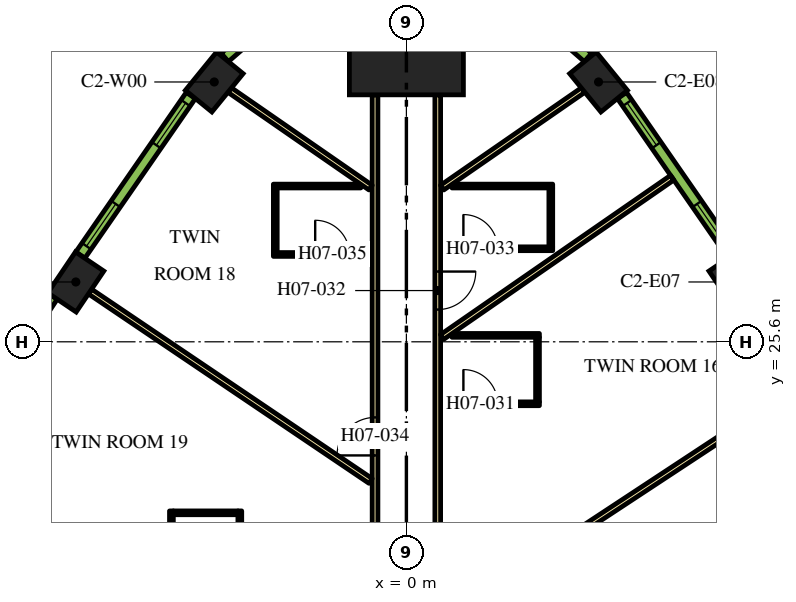
"""IFC4 building model, lengths in metres.
Left out: names, types, materials, properties, quantities, classifications, styles, units other than length and angle.
Written with IfcOpenShell. Run it as: python <this file> out.ifc"""

import sys

from ifc_helpers import new_model, si_unit, direction, frame, frame_2d, origin, origin_2d, place, context, subcontext, project, spatial, rectangle, extrude, element, fill, save


model = new_model("IFC4")
c1 = context("Model", 3, precision=1e-05, world=origin(), true_north=direction((0.0, 1.0)))
c2 = subcontext(c1, "Body", "Model", "MODEL_VIEW")
j1 = project(units=[si_unit("LENGTHUNIT", "METRE"), si_unit("PLANEANGLEUNIT", "RADIAN")], contexts=[c1])
p1 = place(None, origin())
s1 = spatial("IfcSite", under=j1, at=p1, CompositionType="ELEMENT")
p2 = place(p1, origin())
s2 = spatial("IfcBuilding", under=s1, at=p2, CompositionType="ELEMENT")
p3 = place(p2, frame((0.0, 0.0, 99.3)))
s3 = spatial("IfcBuildingStorey", under=s2, at=p3, CompositionType="ELEMENT", Elevation=99.3)
p4 = place(p3, frame((0.0, 33.598, 0.0), z_axis=(0.0, 0.0, 1.0), x_axis=(0.0, 1.0, 0.0)))
e1 = element("IfcColumn", 1, at=p4, inside=s3, PredefinedType="COLUMN", context=c2, shape_type="SweptSolid", body=[
    extrude(rectangle(XDim=3.0, YDim=3.0, at=origin_2d()), origin(), (0.0, 0.0, 1.0), 3.9),
])
for number, where, z_axis, x_axis in (
    (2, (8.699, 27.174, 0.0), (0.0, 0.0, 1.0), (-0.559, 0.829, 0.0)),
    (3, (5.056, 32.437, 0.0), (0.0, 0.0, 1.0), (-0.632, 0.775, 0.0)),
    (4, (-5.056, 32.437, 0.0), (0.0, 0.0, 1.0), (-0.632, -0.775, 0.0)),
    (5, (-8.699, 27.174, 0.0), (0.0, 0.0, 1.0), (-0.559, -0.829, 0.0)),
):
    element("IfcColumn", number, at=place(p3, frame(where, z_axis=z_axis, x_axis=x_axis)), inside=s3, PredefinedType="COLUMN", context=c2, shape_type="SweptSolid", body=[
        extrude(rectangle(XDim=1.3, YDim=0.9, at=origin_2d()), origin(), (0.0, 0.0, 1.0), 3.9),
    ])
p5 = place(p3, frame((0.825, 32.098, 0.0), z_axis=(0.0, 0.0, 1.0), x_axis=(0.0, -1.0, 0.0)))
e6 = element("IfcWall", 6, at=p5, inside=s3, PredefinedType="PARTITIONING", context=c2, shape_type="SweptSolid", body=[
    extrude(rectangle(XDim=13.543, YDim=0.15, at=frame_2d((6.772, 0.0))), origin(), (0.0, 0.0, 1.0), 2.75),
])
p6 = place(p5, frame((12.213, 0.0, 0.0)))
e7 = element("IfcOpeningElement", 7, at=p6, cuts=e6, PredefinedType="OPENING", context=c2, shape_type="SweptSolid", body=[
    extrude(rectangle(XDim=1.0, YDim=2.1, at=frame_2d((0.5, 1.05))), frame((0.0, 0.085, 0.0), z_axis=(0.0, -1.0, 0.0), x_axis=(1.0, 0.0, 0.0)), (0.0, 0.0, 1.0), 0.17),
])
p7 = place(p5, frame((4.65, 0.0, 0.0)))
e8 = element("IfcOpeningElement", 8, at=p7, cuts=e6, PredefinedType="OPENING", context=c2, shape_type="SweptSolid", body=[
    extrude(rectangle(XDim=1.0, YDim=2.1, at=frame_2d((0.5, 1.05))), frame((0.0, 0.085, 0.0), z_axis=(0.0, -1.0, 0.0), x_axis=(1.0, 0.0, 0.0)), (0.0, 0.0, 1.0), 0.17),
])
p8 = place(p3, frame((-0.825, 18.475, 0.0), z_axis=(0.0, 0.0, 1.0), x_axis=(0.0, 1.0, 0.0)))
e9 = element("IfcWall", 9, at=p8, inside=s3, PredefinedType="PARTITIONING", context=c2, shape_type="SweptSolid", body=[
    extrude(rectangle(XDim=13.623, YDim=0.15, at=frame_2d((6.812, 0.0))), origin(), (0.0, 0.0, 1.0), 2.75),
])
p9 = place(p8, frame((4.135, 0.0, 0.0)))
e10 = element("IfcOpeningElement", 10, at=p9, cuts=e9, PredefinedType="OPENING", context=c2, shape_type="SweptSolid", body=[
    extrude(rectangle(XDim=1.0, YDim=2.1, at=frame_2d((0.5, 1.05))), frame((0.0, 0.085, 0.0), z_axis=(0.0, -1.0, 0.0), x_axis=(1.0, 0.0, 0.0)), (0.0, 0.0, 1.0), 0.17),
])
p10 = place(p3, frame((-11.838, 21.585, 0.0), z_axis=(0.0, 0.0, 1.0), x_axis=(0.841699322813, -0.539946525108, 0.0)))
e11 = element("IfcWall", 11, at=p10, inside=s3, PredefinedType="PARTITIONING", context=c2, shape_type="SweptSolid", body=[
    extrude(rectangle(XDim=6.392, YDim=0.15, at=frame_2d((3.196, 0.0))), origin(), (0.0, 0.0, 1.0), 2.75),
])
p11 = place(p3, frame((-8.326, 26.923, 0.0), z_axis=(0.0, 0.0, 1.0), x_axis=(0.828836601893, -0.5594907393, 0.0)))
e12 = element("IfcWall", 12, at=p11, inside=s3, PredefinedType="PARTITIONING", context=c2, shape_type="SweptSolid", body=[
    extrude(rectangle(XDim=8.909, YDim=0.15, at=frame_2d((4.455, 0.0))), origin(), (0.0, 0.0, 1.0), 2.75),
])
p12 = place(p3, frame((-4.649, 32.223, 0.0), z_axis=(0.0, 0.0, 1.0), x_axis=(0.822262349475, -0.569108626394, 0.0)))
e13 = element("IfcWall", 13, at=p12, inside=s3, PredefinedType="PARTITIONING", context=c2, shape_type="SweptSolid", body=[
    extrude(rectangle(XDim=4.51, YDim=0.15, at=frame_2d((2.255, 0.0))), origin(), (0.0, 0.0, 1.0), 2.75),
])
p13 = place(p3, frame((6.994, 29.917, 0.0), z_axis=(0.0, 0.0, 1.0), x_axis=(-0.822255462494, -0.569118576747, 0.0)))
e14 = element("IfcWall", 14, at=p13, inside=s3, PredefinedType="PARTITIONING", context=c2, shape_type="SweptSolid", body=[
    extrude(rectangle(XDim=7.362, YDim=0.15, at=frame_2d((3.681, 0.0))), origin(), (0.0, 0.0, 1.0), 2.75),
])
p14 = place(p3, frame((10.592, 24.589, 0.0), z_axis=(0.0, 0.0, 1.0), x_axis=(-0.835337323748, -0.549737715236, 0.0)))
e15 = element("IfcWall", 15, at=p14, inside=s3, PredefinedType="PARTITIONING", context=c2, shape_type="SweptSolid", body=[
    extrude(rectangle(XDim=10.875, YDim=0.15, at=frame_2d((5.438, 0.0))), origin(), (0.0, 0.0, 1.0), 2.75),
])
p15 = place(p3, frame((4.649, 32.223, 0.0), z_axis=(0.0, 0.0, 1.0), x_axis=(-0.822262349475, -0.569108626394, 0.0)))
e16 = element("IfcWall", 16, at=p15, inside=s3, PredefinedType="PARTITIONING", context=c2, shape_type="SweptSolid", body=[
    extrude(rectangle(XDim=4.51, YDim=0.15, at=frame_2d((2.255, 0.0))), origin(), (0.0, 0.0, 1.0), 2.75),
])
p16 = place(p3, frame((0.9, 23.969, 0.0), z_axis=(0.0, 0.0, 1.0), x_axis=(1.0, 0.0, 0.0)))
e17 = element("IfcWall", 17, at=p16, inside=s3, PredefinedType="PARTITIONING", context=c2, shape_type="SweptSolid", body=[
    extrude(rectangle(XDim=2.6, YDim=0.1, at=frame_2d((1.3, 0.0))), origin(), (0.0, 0.0, 1.0), 2.75),
])
p17 = place(p16, frame((0.6, 0.0, 0.0)))
e18 = element("IfcOpeningElement", 18, at=p17, cuts=e17, PredefinedType="OPENING", context=c2, shape_type="SweptSolid", body=[
    extrude(rectangle(XDim=0.9, YDim=2.1, at=frame_2d((0.45, 1.05))), frame((0.0, 0.06, 0.0), z_axis=(0.0, -1.0, 0.0), x_axis=(1.0, 0.0, 0.0)), (0.0, 0.0, 1.0), 0.12),
])
p18 = place(p3, frame((3.45, 24.019, 0.0), z_axis=(0.0, 0.0, 1.0), x_axis=(0.0, 1.0, 0.0)))
e19 = element("IfcWall", 19, at=p18, inside=s3, PredefinedType="PARTITIONING", context=c2, shape_type="SweptSolid", body=[
    extrude(rectangle(XDim=1.7, YDim=0.1, at=frame_2d((0.85, 0.0))), origin(), (0.0, 0.0, 1.0), 2.75),
])
p19 = place(p3, frame((1.2, 25.769, 0.0), z_axis=(0.0, 0.0, 1.0), x_axis=(1.0, 0.0, 0.0)))
e20 = element("IfcWall", 20, at=p19, inside=s3, PredefinedType="PARTITIONING", context=c2, shape_type="SweptSolid", body=[
    extrude(rectangle(XDim=2.3, YDim=0.1, at=frame_2d((1.15, 0.0))), origin(), (0.0, 0.0, 1.0), 2.75),
])
p20 = place(p3, frame((0.9, 28.048, 0.0), z_axis=(0.0, 0.0, 1.0), x_axis=(1.0, 0.0, 0.0)))
e21 = element("IfcWall", 21, at=p20, inside=s3, PredefinedType="PARTITIONING", context=c2, shape_type="SweptSolid", body=[
    extrude(rectangle(XDim=2.95, YDim=0.1, at=frame_2d((1.475, 0.0))), origin(), (0.0, 0.0, 1.0), 2.75),
])
p21 = place(p20, frame((0.6, 0.0, 0.0)))
e22 = element("IfcOpeningElement", 22, at=p21, cuts=e21, PredefinedType="OPENING", context=c2, shape_type="SweptSolid", body=[
    extrude(rectangle(XDim=0.9, YDim=2.1, at=frame_2d((0.45, 1.05))), frame((0.0, 0.06, 0.0), z_axis=(0.0, -1.0, 0.0), x_axis=(1.0, 0.0, 0.0)), (0.0, 0.0, 1.0), 0.12),
])
p22 = place(p3, frame((3.8, 28.098, 0.0), z_axis=(0.0, 0.0, 1.0), x_axis=(0.0, 1.0, 0.0)))
e23 = element("IfcWall", 23, at=p22, inside=s3, PredefinedType="PARTITIONING", context=c2, shape_type="SweptSolid", body=[
    extrude(rectangle(XDim=1.55, YDim=0.1, at=frame_2d((0.775, 0.0))), origin(), (0.0, 0.0, 1.0), 2.75),
])
p23 = place(p3, frame((1.2, 29.698, 0.0), z_axis=(0.0, 0.0, 1.0), x_axis=(1.0, 0.0, 0.0)))
e24 = element("IfcWall", 24, at=p23, inside=s3, PredefinedType="PARTITIONING", context=c2, shape_type="SweptSolid", body=[
    extrude(rectangle(XDim=2.65, YDim=0.1, at=frame_2d((1.325, 0.0))), origin(), (0.0, 0.0, 1.0), 2.75),
])
p24 = place(p3, frame((-3.5, 27.898, 0.0), z_axis=(0.0, 0.0, 1.0), x_axis=(1.0, 0.0, 0.0)))
e25 = element("IfcWall", 25, at=p24, inside=s3, PredefinedType="PARTITIONING", context=c2, shape_type="SweptSolid", body=[
    extrude(rectangle(XDim=2.6, YDim=0.1, at=frame_2d((1.3, 0.0))), origin(), (0.0, 0.0, 1.0), 2.75),
])
p25 = place(p24, frame((1.1, 0.0, 0.0)))
e26 = element("IfcOpeningElement", 26, at=p25, cuts=e25, PredefinedType="OPENING", context=c2, shape_type="SweptSolid", body=[
    extrude(rectangle(XDim=0.9, YDim=2.1, at=frame_2d((0.45, 1.05))), frame((0.0, 0.06, 0.0), z_axis=(0.0, -1.0, 0.0), x_axis=(1.0, 0.0, 0.0)), (0.0, 0.0, 1.0), 0.12),
])
p26 = place(p3, frame((-3.45, 27.948, 0.0), z_axis=(0.0, 0.0, 1.0), x_axis=(0.0, 1.0, 0.0)))
e27 = element("IfcWall", 27, at=p26, inside=s3, PredefinedType="PARTITIONING", context=c2, shape_type="SweptSolid", body=[
    extrude(rectangle(XDim=1.7, YDim=0.1, at=frame_2d((0.85, 0.0))), origin(), (0.0, 0.0, 1.0), 2.75),
])
p27 = place(p3, frame((-1.2, 29.698, 0.0), z_axis=(0.0, 0.0, 1.0), x_axis=(-1.0, 0.0, 0.0)))
e28 = element("IfcWall", 28, at=p27, inside=s3, PredefinedType="PARTITIONING", context=c2, shape_type="SweptSolid", body=[
    extrude(rectangle(XDim=2.3, YDim=0.1, at=frame_2d((1.15, 0.0))), origin(), (0.0, 0.0, 1.0), 2.75),
])
p28 = place(p3, frame((-4.383, 18.55, 0.0), z_axis=(0.0, 0.0, 1.0), x_axis=(0.0, 1.0, 0.0)))
e29 = element("IfcWall", 29, at=p28, inside=s3, PredefinedType="PARTITIONING", context=c2, shape_type="SweptSolid", body=[
    extrude(rectangle(XDim=2.6, YDim=0.1, at=frame_2d((1.3, 0.0))), origin(), (0.0, 0.0, 1.0), 2.75),
])
p29 = place(p28, frame((0.6, 0.0, 0.0)))
e30 = element("IfcOpeningElement", 30, at=p29, cuts=e29, PredefinedType="OPENING", context=c2, shape_type="SweptSolid", body=[
    extrude(rectangle(XDim=0.9, YDim=2.1, at=frame_2d((0.45, 1.05))), frame((0.0, 0.06, 0.0), z_axis=(0.0, -1.0, 0.0), x_axis=(1.0, 0.0, 0.0)), (0.0, 0.0, 1.0), 0.12),
])
p30 = place(p3, frame((-4.433, 21.1, 0.0), z_axis=(0.0, 0.0, 1.0), x_axis=(-1.0, 0.0, 0.0)))
e31 = element("IfcWall", 31, at=p30, inside=s3, PredefinedType="PARTITIONING", context=c2, shape_type="SweptSolid", body=[
    extrude(rectangle(XDim=1.7, YDim=0.1, at=frame_2d((0.85, 0.0))), origin(), (0.0, 0.0, 1.0), 2.75),
])
p31 = place(p3, frame((-6.183, 18.55, 0.0), z_axis=(0.0, 0.0, 1.0), x_axis=(0.0, 1.0, 0.0)))
e32 = element("IfcWall", 32, at=p31, inside=s3, PredefinedType="PARTITIONING", context=c2, shape_type="SweptSolid", body=[
    extrude(rectangle(XDim=2.6, YDim=0.1, at=frame_2d((1.3, 0.0))), origin(), (0.0, 0.0, 1.0), 2.75),
])
p32 = place(p3, frame((8.58, 27.882, 0.0), z_axis=(0.0, 0.0, 1.0), x_axis=(-0.569113019126, 0.822259309136, 0.0)))
e33 = element("IfcWall", 33, at=p32, inside=s3, PredefinedType="SOLIDWALL", context=c2, shape_type="SweptSolid", body=[
    extrude(rectangle(XDim=5.107, YDim=0.29, at=frame_2d((2.553, 0.0))), origin(), (0.0, 0.0, 1.0), 3.65),
])
p33 = place(p32, frame((0.285, 0.0, 0.9)))
e34 = element("IfcOpeningElement", 34, at=p33, cuts=e33, PredefinedType="OPENING", context=c2, shape_type="SweptSolid", body=[
    extrude(rectangle(XDim=1.35, YDim=2.15, at=frame_2d((0.675, 1.075))), frame((0.0, 0.155, 0.0), z_axis=(0.0, -1.0, 0.0), x_axis=(1.0, 0.0, 0.0)), (0.0, 0.0, 1.0), 0.31),
])
p34 = place(p32, frame((3.516, 0.0, 0.9)))
e35 = element("IfcOpeningElement", 35, at=p34, cuts=e33, PredefinedType="OPENING", context=c2, shape_type="SweptSolid", body=[
    extrude(rectangle(XDim=1.35, YDim=2.15, at=frame_2d((0.675, 1.075))), frame((0.0, 0.155, 0.0), z_axis=(0.0, -1.0, 0.0), x_axis=(1.0, 0.0, 0.0)), (0.0, 0.0, 1.0), 0.31),
])
p35 = place(p3, frame((4.778, 33.082, 0.0), z_axis=(0.0, 0.0, 1.0), x_axis=(-0.754882764627, 0.655859749999, 0.0)))
e36 = element("IfcWall", 36, at=p35, inside=s3, PredefinedType="SOLIDWALL", context=c2, shape_type="SweptSolid", body=[
    extrude(rectangle(XDim=1.82, YDim=0.29, at=frame_2d((0.91, 0.0))), origin(), (0.0, 0.0, 1.0), 3.65),
])
p36 = place(p35, frame((0.46, 0.0, 0.9)))
e37 = element("IfcOpeningElement", 37, at=p36, cuts=e36, PredefinedType="OPENING", context=c2, shape_type="SweptSolid", body=[
    extrude(rectangle(XDim=0.9, YDim=2.15, at=frame_2d((0.45, 1.075))), frame((0.0, 0.155, 0.0), z_axis=(0.0, -1.0, 0.0), x_axis=(1.0, 0.0, 0.0)), (0.0, 0.0, 1.0), 0.31),
])
p37 = place(p3, frame((-3.405, 34.275, 0.0), z_axis=(0.0, 0.0, 1.0), x_axis=(-0.754882764627, -0.655859749999, 0.0)))
e38 = element("IfcWall", 38, at=p37, inside=s3, PredefinedType="SOLIDWALL", context=c2, shape_type="SweptSolid", body=[
    extrude(rectangle(XDim=1.82, YDim=0.29, at=frame_2d((0.91, 0.0))), origin(), (0.0, 0.0, 1.0), 3.65),
])
p38 = place(p37, frame((0.46, 0.0, 0.9)))
e39 = element("IfcOpeningElement", 39, at=p38, cuts=e38, PredefinedType="OPENING", context=c2, shape_type="SweptSolid", body=[
    extrude(rectangle(XDim=0.9, YDim=2.15, at=frame_2d((0.45, 1.075))), frame((0.0, 0.155, 0.0), z_axis=(0.0, -1.0, 0.0), x_axis=(1.0, 0.0, 0.0)), (0.0, 0.0, 1.0), 0.31),
])
p39 = place(p3, frame((-5.673, 32.081, 0.0), z_axis=(0.0, 0.0, 1.0), x_axis=(-0.569113019126, -0.822259309136, 0.0)))
e40 = element("IfcWall", 40, at=p39, inside=s3, PredefinedType="SOLIDWALL", context=c2, shape_type="SweptSolid", body=[
    extrude(rectangle(XDim=5.107, YDim=0.29, at=frame_2d((2.553, 0.0))), origin(), (0.0, 0.0, 1.0), 3.65),
])
p40 = place(p39, frame((0.24, 0.0, 0.9)))
e41 = element("IfcOpeningElement", 41, at=p40, cuts=e40, PredefinedType="OPENING", context=c2, shape_type="SweptSolid", body=[
    extrude(rectangle(XDim=1.35, YDim=2.15, at=frame_2d((0.675, 1.075))), frame((0.0, 0.155, 0.0), z_axis=(0.0, -1.0, 0.0), x_axis=(1.0, 0.0, 0.0)), (0.0, 0.0, 1.0), 0.31),
])
p41 = place(p39, frame((3.471, 0.0, 0.9)))
e42 = element("IfcOpeningElement", 42, at=p41, cuts=e40, PredefinedType="OPENING", context=c2, shape_type="SweptSolid", body=[
    extrude(rectangle(XDim=1.35, YDim=2.15, at=frame_2d((0.675, 1.075))), frame((0.0, 0.155, 0.0), z_axis=(0.0, -1.0, 0.0), x_axis=(1.0, 0.0, 0.0)), (0.0, 0.0, 1.0), 0.31),
])
p42 = place(p3, frame((-9.311, 26.799, 0.0), z_axis=(0.0, 0.0, 1.0), x_axis=(-0.549741341923, -0.835334937005, 0.0)))
e43 = element("IfcWall", 43, at=p42, inside=s3, PredefinedType="SOLIDWALL", context=c2, shape_type="SweptSolid", body=[
    extrude(rectangle(XDim=5.1, YDim=0.29, at=frame_2d((2.55, 0.0))), origin(), (0.0, 0.0, 1.0), 3.65),
])
p43 = place(p42, frame((0.273, 0.0, 0.9)))
e44 = element("IfcOpeningElement", 44, at=p43, cuts=e43, PredefinedType="OPENING", context=c2, shape_type="SweptSolid", body=[
    extrude(rectangle(XDim=1.35, YDim=2.15, at=frame_2d((0.675, 1.075))), frame((0.0, 0.155, 0.0), z_axis=(0.0, -1.0, 0.0), x_axis=(1.0, 0.0, 0.0)), (0.0, 0.0, 1.0), 0.31),
])
p44 = place(p42, frame((3.478, 0.0, 0.9)))
e45 = element("IfcOpeningElement", 45, at=p44, cuts=e43, PredefinedType="OPENING", context=c2, shape_type="SweptSolid", body=[
    extrude(rectangle(XDim=1.35, YDim=2.15, at=frame_2d((0.675, 1.075))), frame((0.0, 0.155, 0.0), z_axis=(0.0, -1.0, 0.0), x_axis=(1.0, 0.0, 0.0)), (0.0, 0.0, 1.0), 0.31),
])
p45 = place(p17, origin())
e46 = element("IfcDoor", 46, at=p45, inside=s3, OperationType="SINGLE_SWING_LEFT", PredefinedType="DOOR", context=c2, shape_type="SweptSolid", body=[
    extrude(rectangle(XDim=0.9, YDim=2.1, at=frame_2d((0.45, 1.05))), frame((0.0, 0.025, 0.0), z_axis=(0.0, -1.0, 0.0), x_axis=(1.0, 0.0, 0.0)), (0.0, 0.0, 1.0), 0.05),
])
fill(e18, e46)
p46 = place(p7, origin())
e47 = element("IfcDoor", 47, at=p46, inside=s3, OperationType="SINGLE_SWING_RIGHT", PredefinedType="DOOR", context=c2, shape_type="SweptSolid", body=[
    extrude(rectangle(XDim=1.0, YDim=2.1, at=frame_2d((0.5, 1.05))), frame((0.0, 0.025, 0.0), z_axis=(0.0, -1.0, 0.0), x_axis=(1.0, 0.0, 0.0)), (0.0, 0.0, 1.0), 0.05),
])
fill(e8, e47)
p47 = place(p21, origin())
e48 = element("IfcDoor", 48, at=p47, inside=s3, OperationType="SINGLE_SWING_LEFT", PredefinedType="DOOR", context=c2, shape_type="SweptSolid", body=[
    extrude(rectangle(XDim=0.9, YDim=2.1, at=frame_2d((0.45, 1.05))), frame((0.0, 0.025, 0.0), z_axis=(0.0, -1.0, 0.0), x_axis=(1.0, 0.0, 0.0)), (0.0, 0.0, 1.0), 0.05),
])
fill(e22, e48)
p48 = place(p9, origin())
e49 = element("IfcDoor", 49, at=p48, inside=s3, OperationType="SINGLE_SWING_LEFT", PredefinedType="DOOR", context=c2, shape_type="SweptSolid", body=[
    extrude(rectangle(XDim=1.0, YDim=2.1, at=frame_2d((0.5, 1.05))), frame((0.0, 0.025, 0.0), z_axis=(0.0, -1.0, 0.0), x_axis=(1.0, 0.0, 0.0)), (0.0, 0.0, 1.0), 0.05),
])
fill(e10, e49)
p49 = place(p25, origin())
e50 = element("IfcDoor", 50, at=p49, inside=s3, OperationType="SINGLE_SWING_RIGHT", PredefinedType="DOOR", context=c2, shape_type="SweptSolid", body=[
    extrude(rectangle(XDim=0.9, YDim=2.1, at=frame_2d((0.45, 1.05))), frame((0.0, 0.025, 0.0), z_axis=(0.0, -1.0, 0.0), x_axis=(1.0, 0.0, 0.0)), (0.0, 0.0, 1.0), 0.05),
])
fill(e26, e50)
p50 = place(p33, origin())
e51 = element("IfcWindow", 51, at=p50, inside=s3, PartitioningType="DOUBLE_PANEL_VERTICAL", PredefinedType="WINDOW", context=c2, shape_type="SweptSolid", body=[
    extrude(rectangle(XDim=1.35, YDim=2.15, at=frame_2d((0.675, 1.075))), frame((0.0, 0.015, 0.0), z_axis=(0.0, -1.0, 0.0), x_axis=(1.0, 0.0, 0.0)), (0.0, 0.0, 1.0), 0.06),
])
fill(e34, e51)
p51 = place(p34, origin())
e52 = element("IfcWindow", 52, at=p51, inside=s3, PartitioningType="DOUBLE_PANEL_VERTICAL", PredefinedType="WINDOW", context=c2, shape_type="SweptSolid", body=[
    extrude(rectangle(XDim=1.35, YDim=2.15, at=frame_2d((0.675, 1.075))), frame((0.0, 0.015, 0.0), z_axis=(0.0, -1.0, 0.0), x_axis=(1.0, 0.0, 0.0)), (0.0, 0.0, 1.0), 0.06),
])
fill(e35, e52)
p52 = place(p40, origin())
e53 = element("IfcWindow", 53, at=p52, inside=s3, PartitioningType="DOUBLE_PANEL_VERTICAL", PredefinedType="WINDOW", context=c2, shape_type="SweptSolid", body=[
    extrude(rectangle(XDim=1.35, YDim=2.15, at=frame_2d((0.675, 1.075))), frame((0.0, 0.015, 0.0), z_axis=(0.0, -1.0, 0.0), x_axis=(1.0, 0.0, 0.0)), (0.0, 0.0, 1.0), 0.06),
])
fill(e41, e53)
p53 = place(p41, origin())
e54 = element("IfcWindow", 54, at=p53, inside=s3, PartitioningType="DOUBLE_PANEL_VERTICAL", PredefinedType="WINDOW", context=c2, shape_type="SweptSolid", body=[
    extrude(rectangle(XDim=1.35, YDim=2.15, at=frame_2d((0.675, 1.075))), frame((0.0, 0.015, 0.0), z_axis=(0.0, -1.0, 0.0), x_axis=(1.0, 0.0, 0.0)), (0.0, 0.0, 1.0), 0.06),
])
fill(e42, e54)
save(model, sys.argv[1])
